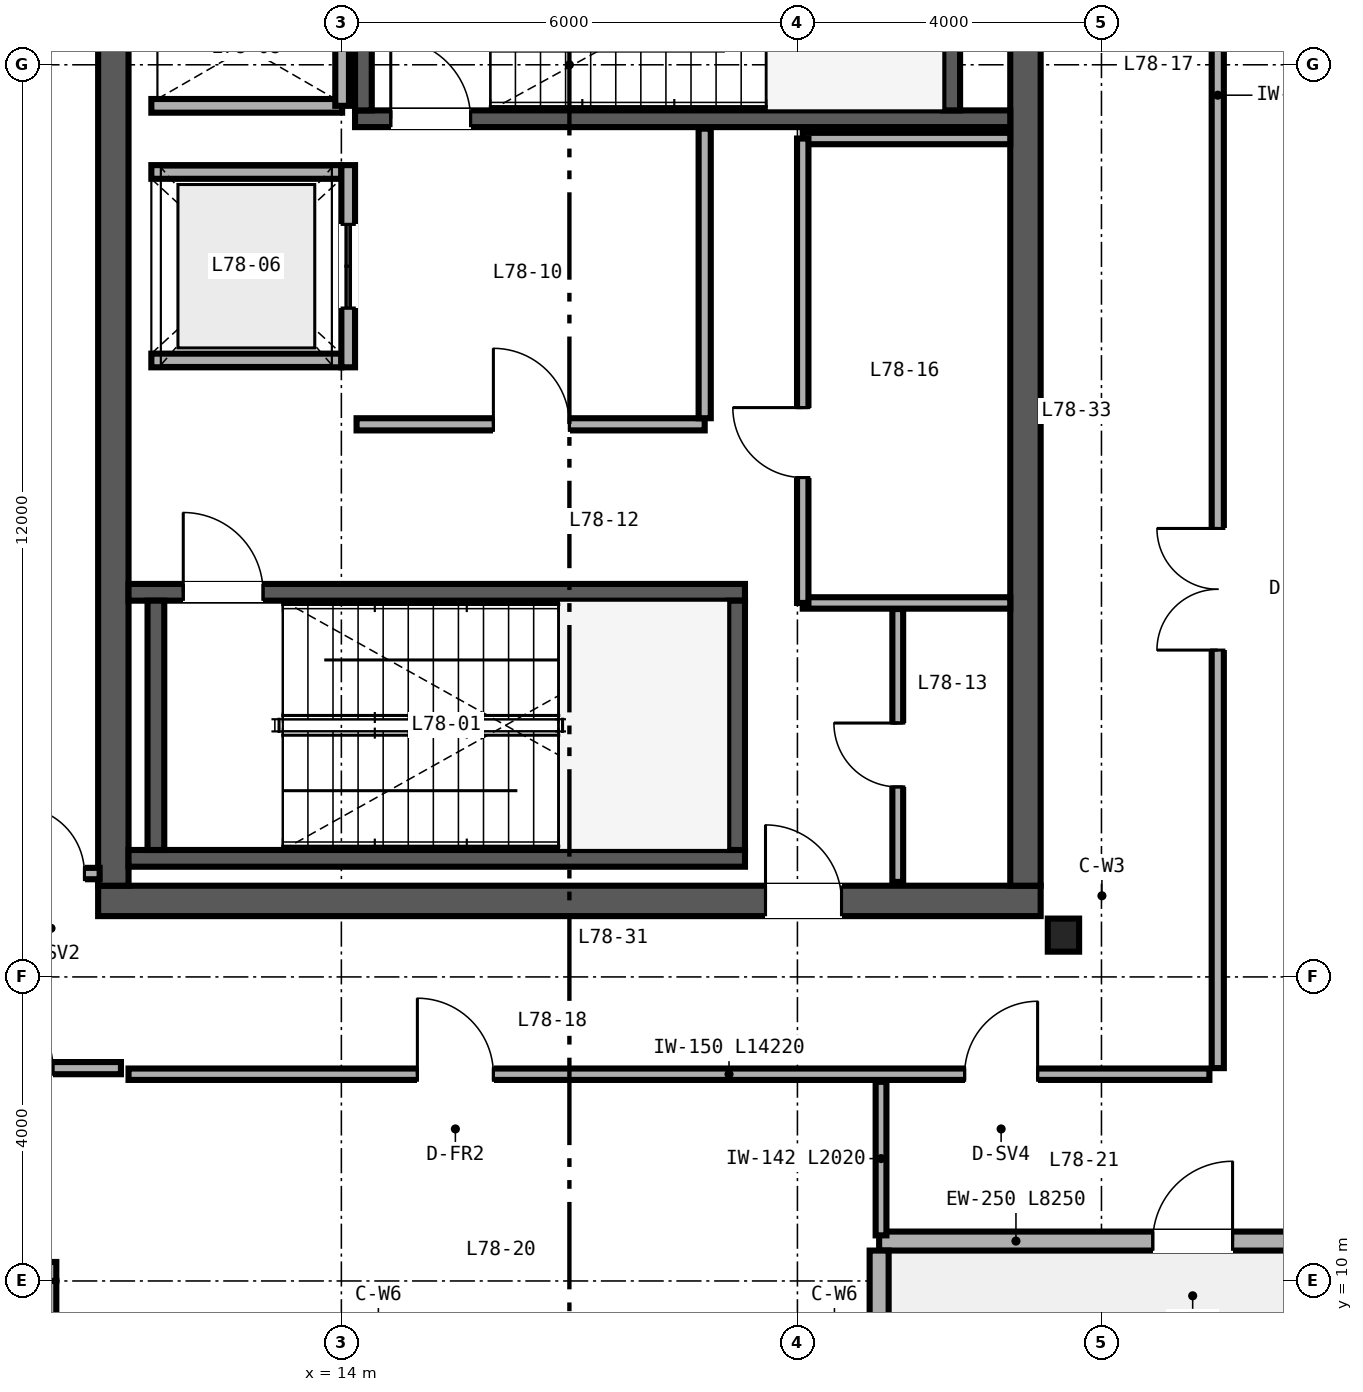
"""IFC4 building model, lengths in metres.
Left out: names, types, materials, properties, quantities, classifications, styles, units other than length and angle.
Written with IfcOpenShell. Run it as: python <this file> out.ifc"""

import sys

from ifc_helpers import new_model, si_unit, direction, frame, frame_2d, origin, origin_2d, place, context, subcontext, project, spatial, rectangle, i_section, extrude, source, transform, mapped, element, fill, save


model = new_model("IFC4")
c1 = context("Model", 3, precision=1e-05, world=origin(), true_north=direction((0.0, 1.0)))
c2 = subcontext(c1, "Body", "Model", "MODEL_VIEW")
j1 = project(units=[si_unit("LENGTHUNIT", "METRE"), si_unit("PLANEANGLEUNIT", "RADIAN")], contexts=[c1])
p1 = place(None, origin())
s1 = spatial("IfcSite", under=j1, at=p1, CompositionType="ELEMENT")
p2 = place(p1, origin())
s2 = spatial("IfcBuilding", under=s1, at=p2, CompositionType="ELEMENT")
p3 = place(p2, frame((0.0, 0.0, 305.4)))
s3 = spatial("IfcBuildingStorey", under=s2, at=p3, CompositionType="ELEMENT", Elevation=305.4)
p4 = place(p3, frame((10.8, 15.0, 0.0), z_axis=(0.0, 0.0, 1.0), x_axis=(1.0, 0.0, 0.0)))
e1 = element("IfcWall", 1, at=p4, inside=s3, PredefinedType="SHEAR", context=c2, shape_type="SweptSolid", body=[
    extrude(rectangle(XDim=12.4, YDim=0.4, at=frame_2d((6.2, 0.0))), origin(), (0.0, 0.0, 1.0), 3.88),
])
p5 = place(p4, frame((8.78, 0.0, 0.0)))
e2 = element("IfcOpeningElement", 2, at=p5, cuts=e1, PredefinedType="OPENING", context=c2, shape_type="SweptSolid", body=[
    extrude(rectangle(XDim=1.0, YDim=2.15, at=frame_2d((0.5, 1.075))), frame((0.0, 0.21, 0.0), z_axis=(0.0, -1.0, 0.0), x_axis=(1.0, 0.0, 0.0)), (0.0, 0.0, 1.0), 0.42),
])
for number, where, z_axis, x_axis in (
    (3, (11.0, 15.2, 0.0), (0.0, 0.0, 1.0), (0.0, 1.0, 0.0)),
    (4, (23.0, 15.2, 0.0), (0.0, 0.0, 1.0), (0.0, 1.0, 0.0)),
):
    element("IfcWall", number, at=place(p3, frame(where, z_axis=z_axis, x_axis=x_axis)), inside=s3, PredefinedType="SHEAR", context=c2, shape_type="SweptSolid", body=[
        extrude(rectangle(XDim=21.6, YDim=0.4, at=frame_2d((10.8, 0.0))), origin(), (0.0, 0.0, 1.0), 3.88),
    ])
p6 = place(p3, frame((11.2, 15.56, 0.0), z_axis=(0.0, 0.0, 1.0), x_axis=(1.0, 0.0, 0.0)))
e5 = element("IfcWall", 5, at=p6, inside=s3, PredefinedType="SHEAR", context=c2, shape_type="SweptSolid", body=[
    extrude(rectangle(XDim=8.11, YDim=0.22, at=frame_2d((4.055, 0.0))), origin(), (0.0, 0.0, 1.0), 4.0),
])
p7 = place(p3, frame((11.2, 19.06, 0.0), z_axis=(0.0, 0.0, 1.0), x_axis=(1.0, 0.0, 0.0)))
e6 = element("IfcWall", 6, at=p7, inside=s3, PredefinedType="SHEAR", context=c2, shape_type="SweptSolid", body=[
    extrude(rectangle(XDim=8.11, YDim=0.22, at=frame_2d((4.055, 0.0))), origin(), (0.0, 0.0, 1.0), 4.0),
])
p8 = place(p7, frame((0.72, 0.0, 0.0)))
e7 = element("IfcOpeningElement", 7, at=p8, cuts=e6, PredefinedType="OPENING", context=c2, shape_type="SweptSolid", body=[
    extrude(rectangle(XDim=1.05, YDim=2.15, at=frame_2d((0.525, 1.075))), frame((0.0, 0.12, 0.0), z_axis=(0.0, -1.0, 0.0), x_axis=(1.0, 0.0, 0.0)), (0.0, 0.0, 1.0), 0.24),
])
for number, where, z_axis, x_axis in (
    (8, (11.56, 15.67, 0.0), (0.0, 0.0, 1.0), (0.0, 1.0, 0.0)),
    (9, (19.2, 15.67, 0.0), (0.0, 0.0, 1.0), (0.0, 1.0, 0.0)),
):
    element("IfcWall", number, at=place(p3, frame(where, z_axis=z_axis, x_axis=x_axis)), inside=s3, PredefinedType="SHEAR", context=c2, shape_type="SweptSolid", body=[
        extrude(rectangle(XDim=3.28, YDim=0.22, at=frame_2d((1.64, 0.0))), origin(), (0.0, 0.0, 1.0), 4.0),
    ])
p9 = place(p3, frame((14.18, 25.29, 0.0), z_axis=(0.0, 0.0, 1.0), x_axis=(1.0, 0.0, 0.0)))
e10 = element("IfcWall", 10, at=p9, inside=s3, PredefinedType="SHEAR", context=c2, shape_type="SweptSolid", body=[
    extrude(rectangle(XDim=8.62, YDim=0.22, at=frame_2d((4.31, 0.0))), origin(), (0.0, 0.0, 1.0), 4.0),
])
p10 = place(p9, frame((0.47, 0.0, 0.0)))
e11 = element("IfcOpeningElement", 11, at=p10, cuts=e10, PredefinedType="OPENING", context=c2, shape_type="SweptSolid", body=[
    extrude(rectangle(XDim=1.05, YDim=2.15, at=frame_2d((0.525, 1.075))), frame((0.0, 0.12, 0.0), z_axis=(0.0, -1.0, 0.0), x_axis=(1.0, 0.0, 0.0)), (0.0, 0.0, 1.0), 0.24),
])
for number, where, z_axis, x_axis in (
    (12, (14.29, 25.4, 0.0), (0.0, 0.0, 1.0), (0.0, 1.0, 0.0)),
    (13, (22.03, 25.4, 0.0), (0.0, 0.0, 1.0), (0.0, 1.0, 0.0)),
):
    element("IfcWall", number, at=place(p3, frame(where, z_axis=z_axis, x_axis=x_axis)), inside=s3, PredefinedType="SHEAR", context=c2, shape_type="SweptSolid", body=[
        extrude(rectangle(XDim=3.28, YDim=0.22, at=frame_2d((1.64, 0.0))), origin(), (0.0, 0.0, 1.0), 4.0),
    ])
m1 = source(origin(), c2, "Body", "SweptSolid", [
    extrude(i_section(OverallWidth=0.412, OverallDepth=0.435, WebThickness=0.036, FlangeThickness=0.057, FilletRadius=0.025, at=origin_2d()), origin(), (0.0, 0.0, 1.0), 3.88),
])
p11 = place(p3, frame((23.5, 14.55, 0.0), z_axis=(0.0, 0.0, 1.0), x_axis=(1.0, 0.0, 0.0)))
e14 = element("IfcColumn", 14, at=p11, inside=s3, PredefinedType="COLUMN", context=c2, shape_type="MappedRepresentation", body=[
    mapped(m1, transform((0.0, 0.0, 0.0), scale=1.0)),
])
for number, where, z_axis, x_axis in (
    (15, (9.25, 10.125, 0.0), (0.0, 0.0, 1.0), (1.0, 0.0, 0.0)),
    (16, (10.125, 10.0, 0.0), (0.0, 0.0, 1.0), (0.0, -1.0, 0.0)),
):
    element("IfcWall", number, at=place(p3, frame(where, z_axis=z_axis, x_axis=x_axis)), inside=s3, PredefinedType="SOLIDWALL", context=c2, shape_type="SweptSolid", body=[
        extrude(rectangle(XDim=1.0, YDim=0.25, at=frame_2d((0.5, 0.0))), origin(), (0.0, 0.0, 1.0), 3.88),
    ])
p12 = place(p3, frame((21.075, 10.525, 0.0), z_axis=(0.0, 0.0, 1.0), x_axis=(1.0, 0.0, 0.0)))
e17 = element("IfcWall", 17, at=p12, inside=s3, PredefinedType="SOLIDWALL", context=c2, shape_type="SweptSolid", body=[
    extrude(rectangle(XDim=8.25, YDim=0.25, at=frame_2d((4.125, 0.0))), origin(), (0.0, 0.0, 1.0), 3.88),
])
p13 = place(p12, frame((3.6, 0.0, 0.0)))
e18 = element("IfcOpeningElement", 18, at=p13, cuts=e17, PredefinedType="OPENING", context=c2, shape_type="SweptSolid", body=[
    extrude(rectangle(XDim=1.05, YDim=2.15, at=frame_2d((0.525, 1.075))), frame((0.0, 0.135, 0.0), z_axis=(0.0, -1.0, 0.0), x_axis=(1.0, 0.0, 0.0)), (0.0, 0.0, 1.0), 0.27),
])
p14 = place(p3, frame((21.075, 8.1, 0.0), z_axis=(0.0, 0.0, 1.0), x_axis=(0.0, 1.0, 0.0)))
e19 = element("IfcWall", 19, at=p14, inside=s3, PredefinedType="SOLIDWALL", context=c2, shape_type="SweptSolid", body=[
    extrude(rectangle(XDim=2.3, YDim=0.25, at=frame_2d((1.15, 0.0))), origin(), (0.0, 0.0, 1.0), 3.88),
])
for number, where, z_axis, x_axis in (
    (20, (11.5, 22.11, 0.0), (0.0, 0.0, 1.0), (1.0, 0.0, 0.0)),
    (21, (11.5, 24.59, 0.0), (0.0, 0.0, 1.0), (1.0, 0.0, 0.0)),
):
    element("IfcWall", number, at=place(p3, frame(where, z_axis=z_axis, x_axis=x_axis)), inside=s3, PredefinedType="SOLIDWALL", context=c2, shape_type="SweptSolid", body=[
        extrude(rectangle(XDim=2.5, YDim=0.18, at=frame_2d((1.25, 0.0))), origin(), (0.0, 0.0, 1.0), 3.88),
    ])
p15 = place(p3, frame((14.09, 22.02, 0.0), z_axis=(0.0, 0.0, 1.0), x_axis=(0.0, 1.0, 0.0)))
e22 = element("IfcWall", 22, at=p15, inside=s3, PredefinedType="SOLIDWALL", context=c2, shape_type="SweptSolid", body=[
    extrude(rectangle(XDim=2.66, YDim=0.18, at=frame_2d((1.33, 0.0))), origin(), (0.0, 0.0, 1.0), 3.88),
])
p16 = place(p15, frame((0.78, 0.0, 0.0)))
e23 = element("IfcOpeningElement", 23, at=p16, cuts=e22, PredefinedType="OPENING", context=c2, shape_type="SweptSolid", body=[
    extrude(rectangle(XDim=1.1, YDim=2.2, at=frame_2d((0.55, 1.1))), frame((0.0, 0.1, 0.0), z_axis=(0.0, -1.0, 0.0), x_axis=(1.0, 0.0, 0.0)), (0.0, 0.0, 1.0), 0.2),
])
p17 = place(p3, frame((11.5, 25.46, 0.0), z_axis=(0.0, 0.0, 1.0), x_axis=(1.0, 0.0, 0.0)))
e24 = element("IfcWall", 24, at=p17, inside=s3, PredefinedType="SOLIDWALL", context=c2, shape_type="SweptSolid", body=[
    extrude(rectangle(XDim=2.51, YDim=0.18, at=frame_2d((1.255, 0.0))), origin(), (0.0, 0.0, 1.0), 3.88),
])
p18 = place(p3, frame((14.01, 25.46, 0.0), z_axis=(0.0, 0.0, 1.0), x_axis=(0.0, 1.0, 0.0)))
e25 = element("IfcWall", 25, at=p18, inside=s3, PredefinedType="SOLIDWALL", context=c2, shape_type="SweptSolid", body=[
    extrude(rectangle(XDim=3.08, YDim=0.18, at=frame_2d((1.54, 0.0))), origin(), (0.0, 0.0, 1.0), 3.88),
])
p19 = place(p3, frame((14.2, 21.27, 0.0), z_axis=(0.0, 0.0, 1.0), x_axis=(1.0, 0.0, 0.0)))
e26 = element("IfcWall", 26, at=p19, inside=s3, PredefinedType="PARTITIONING", context=c2, shape_type="SweptSolid", body=[
    extrude(rectangle(XDim=4.58, YDim=0.16, at=frame_2d((2.29, 0.0))), origin(), (0.0, 0.0, 1.0), 3.88),
])
p20 = place(p19, frame((1.8, 0.0, 0.0)))
e27 = element("IfcOpeningElement", 27, at=p20, cuts=e26, PredefinedType="OPENING", context=c2, shape_type="SweptSolid", body=[
    extrude(rectangle(XDim=1.0, YDim=2.15, at=frame_2d((0.5, 1.075))), frame((0.0, 0.09, 0.0), z_axis=(0.0, -1.0, 0.0), x_axis=(1.0, 0.0, 0.0)), (0.0, 0.0, 1.0), 0.18),
])
p21 = place(p3, frame((18.78, 21.35, 0.0), z_axis=(0.0, 0.0, 1.0), x_axis=(0.0, 1.0, 0.0)))
e28 = element("IfcWall", 28, at=p21, inside=s3, PredefinedType="PARTITIONING", context=c2, shape_type="SweptSolid", body=[
    extrude(rectangle(XDim=3.81, YDim=0.16, at=frame_2d((1.905, 0.0))), origin(), (0.0, 0.0, 1.0), 3.88),
])
p22 = place(p3, frame((21.32, 15.25, 0.0), z_axis=(0.0, 0.0, 1.0), x_axis=(0.0, 1.0, 0.0)))
e29 = element("IfcWall", 29, at=p22, inside=s3, PredefinedType="PARTITIONING", context=c2, shape_type="SweptSolid", body=[
    extrude(rectangle(XDim=3.59, YDim=0.142, at=frame_2d((1.795, 0.0))), origin(), (0.0, 0.0, 1.0), 3.88),
])
p23 = place(p22, frame((1.25, 0.0, 0.0)))
e30 = element("IfcOpeningElement", 30, at=p23, cuts=e29, PredefinedType="OPENING", context=c2, shape_type="SweptSolid", body=[
    extrude(rectangle(XDim=0.84, YDim=2.1, at=frame_2d((0.42, 1.05))), frame((0.0, 0.081, 0.0), z_axis=(0.0, -1.0, 0.0), x_axis=(1.0, 0.0, 0.0)), (0.0, 0.0, 1.0), 0.162),
])
for number, where, z_axis, x_axis in (
    (31, (20.07, 18.92, 0.0), (0.0, 0.0, 1.0), (1.0, 0.0, 0.0)),
    (32, (20.07, 25.03, 0.0), (0.0, 0.0, 1.0), (1.0, 0.0, 0.0)),
):
    element("IfcWall", number, at=place(p3, frame(where, z_axis=z_axis, x_axis=x_axis)), inside=s3, PredefinedType="PARTITIONING", context=c2, shape_type="SweptSolid", body=[
        extrude(rectangle(XDim=2.73, YDim=0.15, at=frame_2d((1.365, 0.0))), origin(), (0.0, 0.0, 1.0), 3.88),
    ])
p24 = place(p3, frame((20.07, 18.92, 0.0), z_axis=(0.0, 0.0, 1.0), x_axis=(0.0, 1.0, 0.0)))
e33 = element("IfcWall", 33, at=p24, inside=s3, PredefinedType="PARTITIONING", context=c2, shape_type="SweptSolid", body=[
    extrude(rectangle(XDim=6.11, YDim=0.15, at=frame_2d((3.055, 0.0))), origin(), (0.0, 0.0, 1.0), 2.98),
])
p25 = place(p24, frame((1.65, 0.0, 0.0)))
e34 = element("IfcOpeningElement", 34, at=p25, cuts=e33, PredefinedType="OPENING", context=c2, shape_type="SweptSolid", body=[
    extrude(rectangle(XDim=0.92, YDim=2.15, at=frame_2d((0.46, 1.075))), frame((0.0, 0.085, 0.0), z_axis=(0.0, -1.0, 0.0), x_axis=(1.0, 0.0, 0.0)), (0.0, 0.0, 1.0), 0.17),
])
p26 = place(p3, frame((11.2, 12.72, 0.0), z_axis=(0.0, 0.0, 1.0), x_axis=(1.0, 0.0, 0.0)))
e35 = element("IfcWall", 35, at=p26, inside=s3, PredefinedType="PARTITIONING", context=c2, shape_type="SweptSolid", body=[
    extrude(rectangle(XDim=14.22, YDim=0.15, at=frame_2d((7.11, 0.0))), origin(), (0.0, 0.0, 1.0), 3.88),
])
p27 = place(p26, frame((3.8, 0.0, 0.0)))
e36 = element("IfcOpeningElement", 36, at=p27, cuts=e35, PredefinedType="OPENING", context=c2, shape_type="SweptSolid", body=[
    extrude(rectangle(XDim=1.0, YDim=2.15, at=frame_2d((0.5, 1.075))), frame((0.0, 0.085, 0.0), z_axis=(0.0, -1.0, 0.0), x_axis=(1.0, 0.0, 0.0)), (0.0, 0.0, 1.0), 0.17),
])
p28 = place(p26, frame((11.0, 0.0, 0.0)))
e37 = element("IfcOpeningElement", 37, at=p28, cuts=e35, PredefinedType="OPENING", context=c2, shape_type="SweptSolid", body=[
    extrude(rectangle(XDim=0.96, YDim=2.15, at=frame_2d((0.48, 1.075))), frame((0.0, 0.085, 0.0), z_axis=(0.0, -1.0, 0.0), x_axis=(1.0, 0.0, 0.0)), (0.0, 0.0, 1.0), 0.17),
])
p29 = place(p3, frame((21.1, 10.6, 0.0), z_axis=(0.0, 0.0, 1.0), x_axis=(0.0, 1.0, 0.0)))
e38 = element("IfcWall", 38, at=p29, inside=s3, PredefinedType="PARTITIONING", context=c2, shape_type="SweptSolid", body=[
    extrude(rectangle(XDim=2.02, YDim=0.142, at=frame_2d((1.01, 0.0))), origin(), (0.0, 0.0, 1.0), 3.88),
])
p30 = place(p3, frame((25.53, 12.8, 0.0), z_axis=(0.0, 0.0, 1.0), x_axis=(0.0, 1.0, 0.0)))
e39 = element("IfcWall", 39, at=p30, inside=s3, PredefinedType="PARTITIONING", context=c2, shape_type="SweptSolid", body=[
    extrude(rectangle(XDim=26.4, YDim=0.16, at=frame_2d((13.2, 0.0))), origin(), (0.0, 0.0, 1.0), 3.024),
])
p31 = place(p30, frame((5.5, 0.0, 0.0)))
e40 = element("IfcOpeningElement", 40, at=p31, cuts=e39, PredefinedType="OPENING", context=c2, shape_type="SweptSolid", body=[
    extrude(rectangle(XDim=1.6, YDim=2.3, at=frame_2d((0.8, 1.15))), frame((0.0, 0.09, 0.0), z_axis=(0.0, -1.0, 0.0), x_axis=(1.0, 0.0, 0.0)), (0.0, 0.0, 1.0), 0.18),
])
p32 = place(p30, frame((18.5, 0.0, 0.0)))
e41 = element("IfcOpeningElement", 41, at=p32, cuts=e39, PredefinedType="OPENING", context=c2, shape_type="SweptSolid", body=[
    extrude(rectangle(XDim=1.6, YDim=2.3, at=frame_2d((0.8, 1.15))), frame((0.0, 0.09, 0.0), z_axis=(0.0, -1.0, 0.0), x_axis=(1.0, 0.0, 0.0)), (0.0, 0.0, 1.0), 0.18),
])
p33 = place(p3, frame((8.16, 15.36, 0.0), z_axis=(0.0, 0.0, 1.0), x_axis=(1.0, 0.0, 0.0)))
e42 = element("IfcWall", 42, at=p33, inside=s3, PredefinedType="PARTITIONING", context=c2, shape_type="SweptSolid", body=[
    extrude(rectangle(XDim=2.66, YDim=0.15, at=frame_2d((1.33, 0.0))), origin(), (0.0, 0.0, 1.0), 3.101),
])
p34 = place(p33, frame((1.58, 0.0, 0.0)))
e43 = element("IfcOpeningElement", 43, at=p34, cuts=e42, PredefinedType="OPENING", context=c2, shape_type="SweptSolid", body=[
    extrude(rectangle(XDim=0.88, YDim=2.15, at=frame_2d((0.44, 1.075))), frame((0.0, 0.085, 0.0), z_axis=(0.0, -1.0, 0.0), x_axis=(1.0, 0.0, 0.0)), (0.0, 0.0, 1.0), 0.17),
])
p35 = place(p3, frame((8.35, 12.8, 0.0), z_axis=(0.0, 0.0, 1.0), x_axis=(1.0, 0.0, 0.0)))
e44 = element("IfcWall", 44, at=p35, inside=s3, PredefinedType="PARTITIONING", context=c2, shape_type="SweptSolid", body=[
    extrude(rectangle(XDim=2.75, YDim=0.16, at=frame_2d((1.375, 0.0))), origin(), (0.0, 0.0, 1.0), 3.88),
])
p36 = place(p35, frame((0.895, 0.0, 0.0)))
e45 = element("IfcOpeningElement", 45, at=p36, cuts=e44, PredefinedType="OPENING", context=c2, shape_type="SweptSolid", body=[
    extrude(rectangle(XDim=0.96, YDim=2.15, at=frame_2d((0.48, 1.075))), frame((0.0, 0.09, 0.0), z_axis=(0.0, -1.0, 0.0), x_axis=(1.0, 0.0, 0.0)), (0.0, 0.0, 1.0), 0.18),
])
m2 = source(origin(), c2, "Body", "SweptSolid", [
    extrude(rectangle(XDim=1.05, YDim=2.15, at=frame_2d((0.525, 1.075))), frame((0.0, 0.025, 0.0), z_axis=(0.0, -1.0, 0.0), x_axis=(1.0, 0.0, 0.0)), (0.0, 0.0, 1.0), 0.05),
])
p37 = place(p13, origin())
e46 = element("IfcDoor", 46, at=p37, inside=s3, OperationType="SINGLE_SWING_RIGHT", PredefinedType="DOOR", context=c2, shape_type="MappedRepresentation", body=[
    mapped(m2, transform((0.0, 0.0, 0.0), scale=1.0)),
])
fill(e18, e46)
p38 = place(p8, origin())
e47 = element("IfcDoor", 47, at=p38, inside=s3, OperationType="SINGLE_SWING_LEFT", PredefinedType="DOOR", context=c2, shape_type="MappedRepresentation", body=[
    mapped(m2, transform((0.0, 0.0, 0.0), scale=1.0)),
])
fill(e7, e47)
p39 = place(p10, origin())
e48 = element("IfcDoor", 48, at=p39, inside=s3, OperationType="SINGLE_SWING_LEFT", PredefinedType="DOOR", context=c2, shape_type="MappedRepresentation", body=[
    mapped(m2, transform((0.0, 0.0, 0.0), scale=1.0)),
])
fill(e11, e48)
m3 = source(origin(), c2, "Body", "SweptSolid", [
    extrude(rectangle(XDim=1.1, YDim=2.2, at=frame_2d((0.55, 1.1))), frame((0.0, 0.025, 0.0), z_axis=(0.0, -1.0, 0.0), x_axis=(1.0, 0.0, 0.0)), (0.0, 0.0, 1.0), 0.05),
])
p40 = place(p16, origin())
e49 = element("IfcDoor", 49, at=p40, inside=s3, OperationType="DOUBLE_DOOR_SLIDING", PredefinedType="DOOR", context=c2, shape_type="MappedRepresentation", body=[
    mapped(m3, transform((0.0, 0.0, 0.0), scale=1.0)),
])
fill(e23, e49)
m4 = source(origin(), c2, "Body", "SweptSolid", [
    extrude(rectangle(XDim=1.0, YDim=2.15, at=frame_2d((0.5, 1.075))), frame((0.0, 0.025, 0.0), z_axis=(0.0, -1.0, 0.0), x_axis=(1.0, 0.0, 0.0)), (0.0, 0.0, 1.0), 0.05),
])
p41 = place(p20, origin())
e50 = element("IfcDoor", 50, at=p41, inside=s3, OperationType="SINGLE_SWING_LEFT", PredefinedType="DOOR", context=c2, shape_type="MappedRepresentation", body=[
    mapped(m4, transform((0.0, 0.0, 0.0), scale=1.0)),
])
fill(e27, e50)
m5 = source(origin(), c2, "Body", "SweptSolid", [
    extrude(rectangle(XDim=0.84, YDim=2.1, at=frame_2d((0.42, 1.05))), frame((0.0, 0.025, 0.0), z_axis=(0.0, -1.0, 0.0), x_axis=(1.0, 0.0, 0.0)), (0.0, 0.0, 1.0), 0.05),
])
p42 = place(p23, origin())
e51 = element("IfcDoor", 51, at=p42, inside=s3, OperationType="SINGLE_SWING_RIGHT", PredefinedType="DOOR", context=c2, shape_type="MappedRepresentation", body=[
    mapped(m5, transform((0.0, 0.0, 0.0), scale=1.0)),
])
fill(e30, e51)
p43 = place(p5, origin())
e52 = element("IfcDoor", 52, at=p43, inside=s3, OperationType="SINGLE_SWING_LEFT", PredefinedType="DOOR", context=c2, shape_type="MappedRepresentation", body=[
    mapped(m4, transform((0.0, 0.0, 0.0), scale=1.0)),
])
fill(e2, e52)
m6 = source(origin(), c2, "Body", "SweptSolid", [
    extrude(rectangle(XDim=0.92, YDim=2.15, at=frame_2d((0.46, 1.075))), frame((0.0, 0.025, 0.0), z_axis=(0.0, -1.0, 0.0), x_axis=(1.0, 0.0, 0.0)), (0.0, 0.0, 1.0), 0.05),
])
p44 = place(p25, origin())
e53 = element("IfcDoor", 53, at=p44, inside=s3, OperationType="SINGLE_SWING_RIGHT", PredefinedType="DOOR", context=c2, shape_type="MappedRepresentation", body=[
    mapped(m6, transform((0.0, 0.0, 0.0), scale=1.0)),
])
fill(e34, e53)
p45 = place(p27, origin())
e54 = element("IfcDoor", 54, at=p45, inside=s3, OperationType="SINGLE_SWING_LEFT", PredefinedType="DOOR", context=c2, shape_type="MappedRepresentation", body=[
    mapped(m4, transform((0.0, 0.0, 0.0), scale=1.0)),
])
fill(e36, e54)
m7 = source(origin(), c2, "Body", "SweptSolid", [
    extrude(rectangle(XDim=0.96, YDim=2.15, at=frame_2d((0.48, 1.075))), frame((0.0, 0.025, 0.0), z_axis=(0.0, -1.0, 0.0), x_axis=(1.0, 0.0, 0.0)), (0.0, 0.0, 1.0), 0.05),
])
p46 = place(p28, origin())
e55 = element("IfcDoor", 55, at=p46, inside=s3, OperationType="SINGLE_SWING_RIGHT", PredefinedType="DOOR", context=c2, shape_type="MappedRepresentation", body=[
    mapped(m7, transform((0.0, 0.0, 0.0), scale=1.0)),
])
fill(e37, e55)
m8 = source(origin(), c2, "Body", "SweptSolid", [
    extrude(rectangle(XDim=1.6, YDim=2.3, at=frame_2d((0.8, 1.15))), frame((0.0, 0.025, 0.0), z_axis=(0.0, -1.0, 0.0), x_axis=(1.0, 0.0, 0.0)), (0.0, 0.0, 1.0), 0.05),
])
p47 = place(p31, origin())
e56 = element("IfcDoor", 56, at=p47, inside=s3, OperationType="DOUBLE_DOOR_SINGLE_SWING", PredefinedType="DOOR", context=c2, shape_type="MappedRepresentation", body=[
    mapped(m8, transform((0.0, 0.0, 0.0), scale=1.0)),
])
fill(e40, e56)
m9 = source(origin(), c2, "Body", "SweptSolid", [
    extrude(rectangle(XDim=0.88, YDim=2.15, at=frame_2d((0.44, 1.075))), frame((0.0, 0.025, 0.0), z_axis=(0.0, -1.0, 0.0), x_axis=(1.0, 0.0, 0.0)), (0.0, 0.0, 1.0), 0.05),
])
p48 = place(p34, origin())
e57 = element("IfcDoor", 57, at=p48, inside=s3, OperationType="SINGLE_SWING_LEFT", PredefinedType="DOOR", context=c2, shape_type="MappedRepresentation", body=[
    mapped(m9, transform((0.0, 0.0, 0.0), scale=1.0)),
])
fill(e43, e57)
p49 = place(p36, origin())
e58 = element("IfcDoor", 58, at=p49, inside=s3, OperationType="SINGLE_SWING_LEFT", PredefinedType="DOOR", context=c2, shape_type="MappedRepresentation", body=[
    mapped(m7, transform((0.0, 0.0, 0.0), scale=1.0)),
])
fill(e45, e58)
save(model, sys.argv[1])
